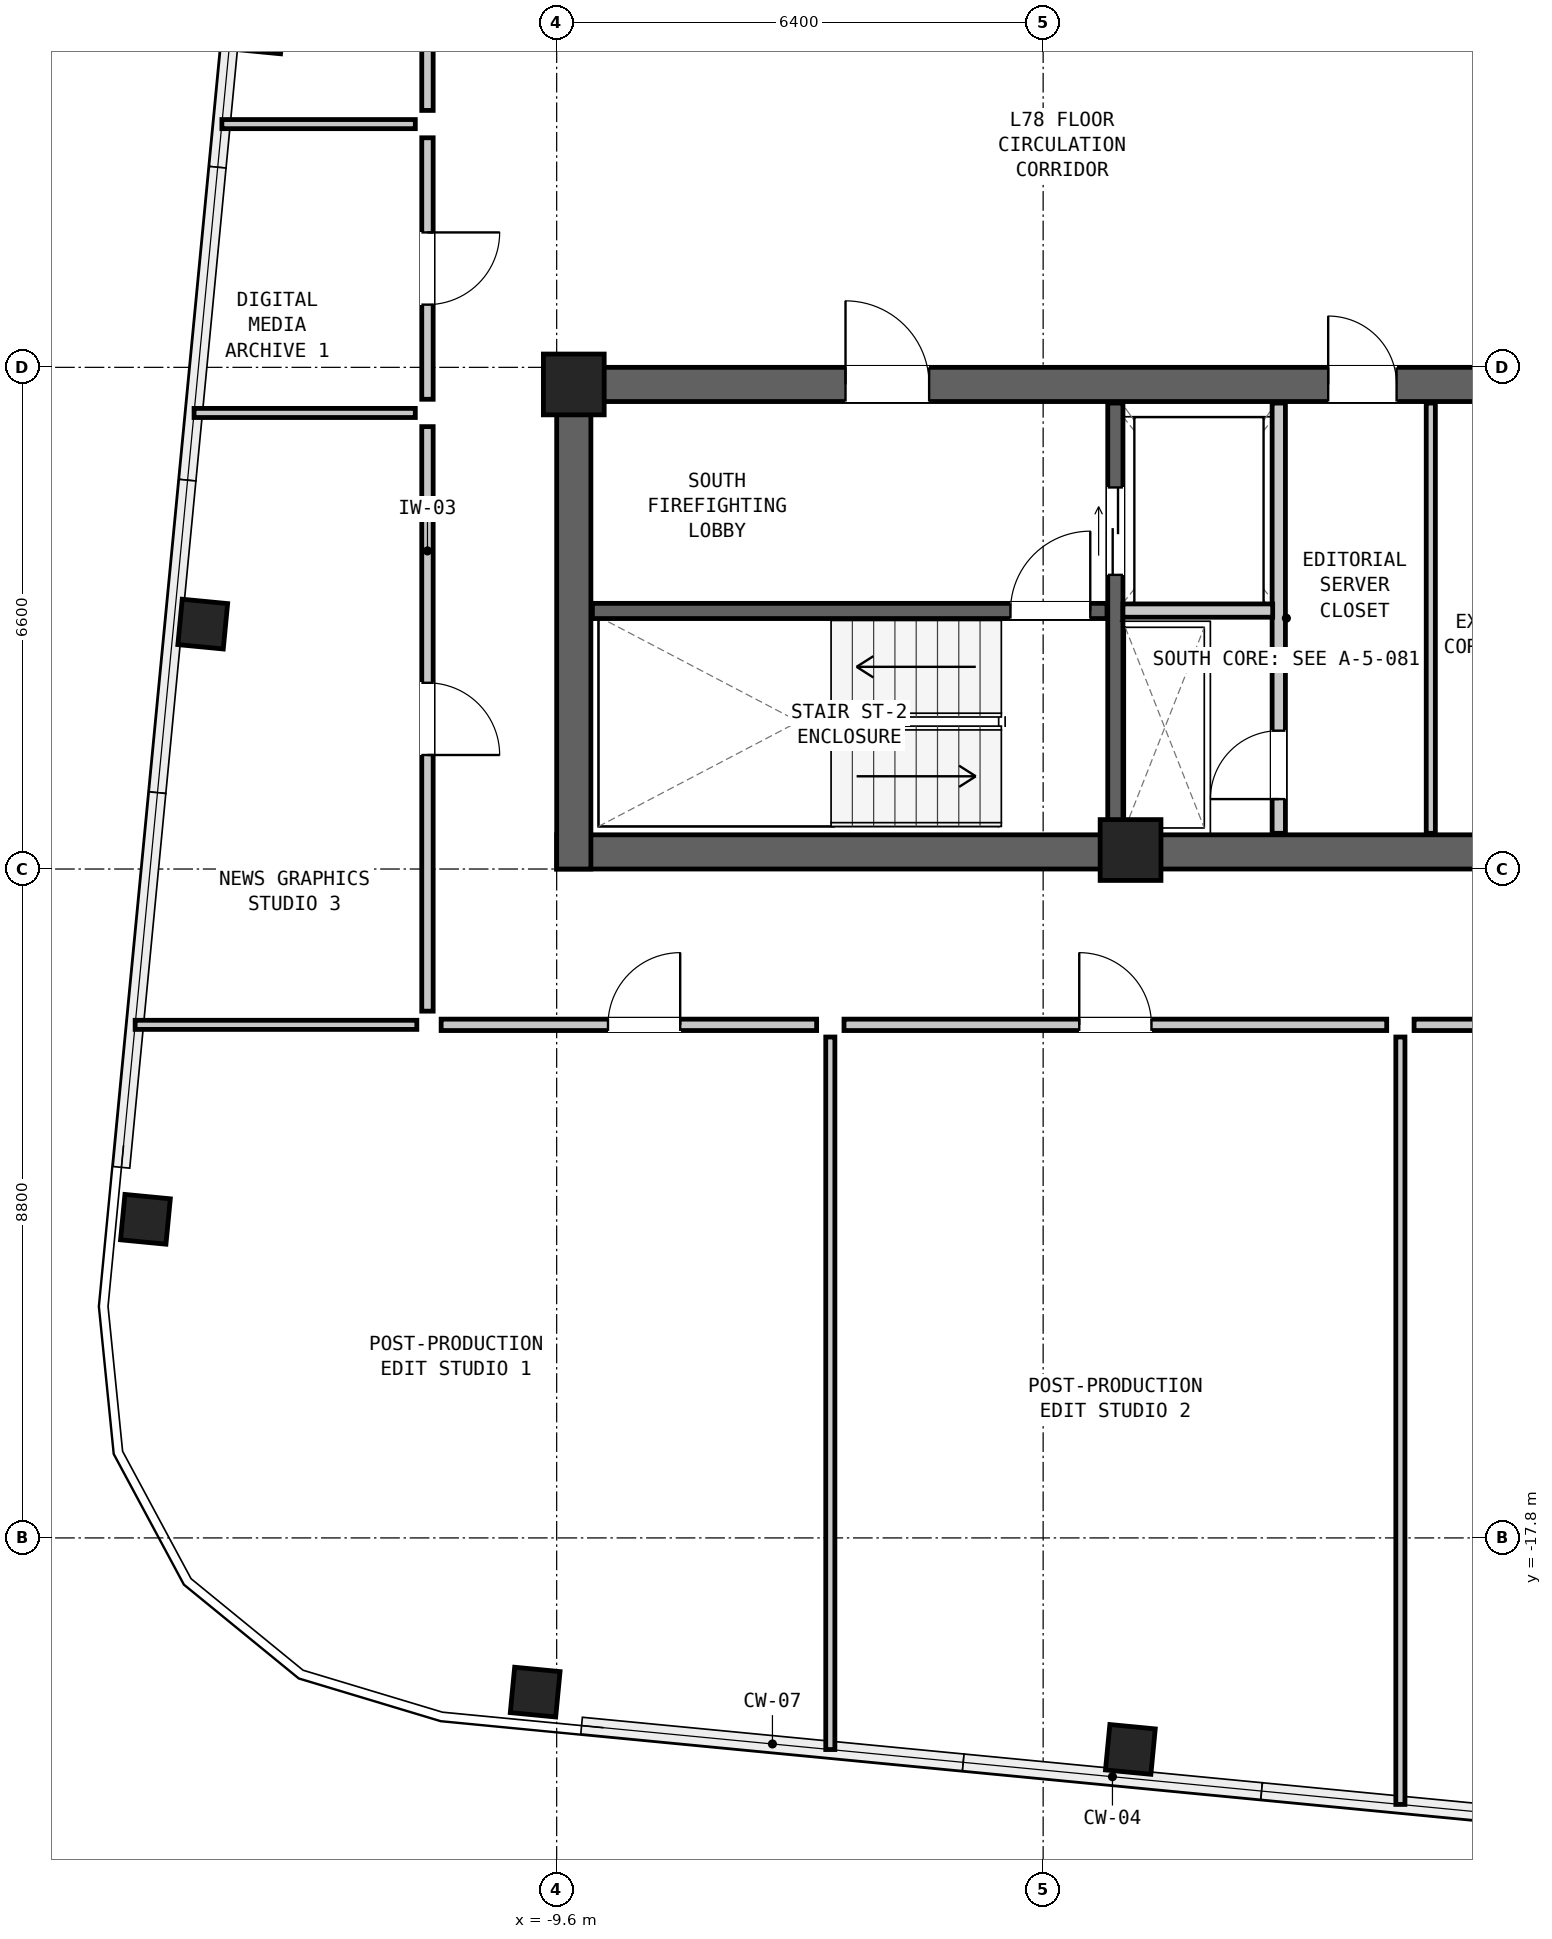
"""IFC4 building model, lengths in metres.
Left out: names, types, materials, properties, quantities, classifications, styles, units other than length and angle.
Written with IfcOpenShell. Run it as: python <this file> out.ifc"""

import sys

from ifc_helpers import new_model, si_unit, direction, frame, frame_2d, origin, origin_2d, place, context, subcontext, project, spatial, rectangle, hollow_rectangle, extrude, element, fill, save


model = new_model("IFC4")
c1 = context("Model", 3, precision=1e-05, world=origin(), true_north=direction((0.0, 1.0)))
c2 = subcontext(c1, "Body", "Model", "MODEL_VIEW")
j1 = project(units=[si_unit("LENGTHUNIT", "METRE"), si_unit("PLANEANGLEUNIT", "RADIAN")], contexts=[c1])
p1 = place(None, origin())
s1 = spatial("IfcSite", under=j1, at=p1, CompositionType="ELEMENT")
p2 = place(p1, origin())
s2 = spatial("IfcBuilding", under=s1, at=p2, CompositionType="ELEMENT")
p3 = place(p2, frame((0.0, 0.0, 264.2)))
s3 = spatial("IfcBuildingStorey", under=s2, at=p3, CompositionType="ELEMENT", Elevation=264.2)
p4 = place(p3, frame((-9.6, -8.775, 0.0), z_axis=(0.0, 0.0, 1.0), x_axis=(1.0, 0.0, 0.0)))
e1 = element("IfcWall", 1, at=p4, inside=s3, PredefinedType="SHEAR", context=c2, shape_type="SweptSolid", body=[
    extrude(rectangle(XDim=19.2, YDim=0.45, at=frame_2d((9.6, 0.0))), origin(), (0.0, 0.0, 1.0), 3.05),
])
p5 = place(p3, frame((-9.6, -2.625, 0.0), z_axis=(0.0, 0.0, 1.0), x_axis=(1.0, 0.0, 0.0)))
e2 = element("IfcWall", 2, at=p5, inside=s3, PredefinedType="SHEAR", context=c2, shape_type="SweptSolid", body=[
    extrude(rectangle(XDim=19.2, YDim=0.45, at=frame_2d((9.6, 0.0))), origin(), (0.0, 0.0, 1.0), 3.05),
])
p6 = place(p5, frame((3.8, 0.0, 0.0)))
e3 = element("IfcOpeningElement", 3, at=p6, cuts=e2, PredefinedType="OPENING", context=c2, shape_type="SweptSolid", body=[
    extrude(rectangle(XDim=1.1, YDim=2.08, at=frame_2d((0.55, 1.04))), frame((0.0, 0.237, 0.0), z_axis=(0.0, -1.0, 0.0), x_axis=(1.0, 0.0, 0.0)), (0.0, 0.0, 1.0), 0.474),
])
p7 = place(p5, frame((10.15, 0.0, 0.0)))
e4 = element("IfcOpeningElement", 4, at=p7, cuts=e2, PredefinedType="OPENING", context=c2, shape_type="SweptSolid", body=[
    extrude(rectangle(XDim=0.9, YDim=2.05, at=frame_2d((0.45, 1.025))), frame((0.0, 0.237, 0.0), z_axis=(0.0, -1.0, 0.0), x_axis=(1.0, 0.0, 0.0)), (0.0, 0.0, 1.0), 0.474),
])
p8 = place(p5, frame((12.1, 0.0, 0.0)))
e5 = element("IfcOpeningElement", 5, at=p8, cuts=e2, PredefinedType="OPENING", context=c2, shape_type="SweptSolid", body=[
    extrude(rectangle(XDim=0.95, YDim=2.1, at=frame_2d((0.475, 1.05))), frame((0.0, 0.237, 0.0), z_axis=(0.0, -1.0, 0.0), x_axis=(1.0, 0.0, 0.0)), (0.0, 0.0, 1.0), 0.474),
])
p9 = place(p5, frame((14.8, 0.0, 0.0)))
e6 = element("IfcOpeningElement", 6, at=p9, cuts=e2, PredefinedType="OPENING", context=c2, shape_type="SweptSolid", body=[
    extrude(rectangle(XDim=1.6, YDim=2.12, at=frame_2d((0.8, 1.06))), frame((0.0, 0.237, 0.0), z_axis=(0.0, -1.0, 0.0), x_axis=(1.0, 0.0, 0.0)), (0.0, 0.0, 1.0), 0.474),
])
p10 = place(p3, frame((-9.375, -9.0, 0.0), z_axis=(0.0, 0.0, 1.0), x_axis=(0.0, 1.0, 0.0)))
e7 = element("IfcWall", 7, at=p10, inside=s3, PredefinedType="SHEAR", context=c2, shape_type="SweptSolid", body=[
    extrude(rectangle(XDim=6.6, YDim=0.45, at=frame_2d((3.3, 0.0))), origin(), (0.0, 0.0, 1.0), 3.05),
])
for number, where, z_axis, x_axis in (
    (8, (-9.883, -19.829, 0.0), (0.0, 0.0, 1.0), (0.995, -0.096, 0.0)),
    (9, (-2.052, -20.583, 0.0), (0.0, 0.0, 1.0), (0.995, -0.096, 0.0)),
    (10, (-13.502, 2.052, 0.0), (0.0, 0.0, 1.0), (0.096, 0.995, 0.0)),
    (11, (-14.256, -5.778, 0.0), (0.0, 0.0, 1.0), (0.096, 0.995, 0.0)),
    (12, (-15.01, -13.608, 0.0), (0.0, 0.0, 1.0), (0.096, 0.995, 0.0)),
):
    element("IfcColumn", number, at=place(p3, frame(where, z_axis=z_axis, x_axis=x_axis)), inside=s3, PredefinedType="COLUMN", context=c2, shape_type="SweptSolid", body=[
        extrude(hollow_rectangle(XDim=0.6, YDim=0.6, WallThickness=0.04, at=origin_2d()), origin(), (0.0, 0.0, 1.0), 3.05),
    ])
for number, where, z_axis, x_axis in (
    (13, (-9.375, -2.625, 0.0), (0.0, 0.0, 1.0), (1.0, 0.0, 0.0)),
    (14, (-2.05, -8.75, 0.0), (0.0, 0.0, 1.0), (1.0, 0.0, 0.0)),
):
    element("IfcColumn", number, at=place(p3, frame(where, z_axis=z_axis, x_axis=x_axis)), inside=s3, PredefinedType="COLUMN", context=c2, shape_type="SweptSolid", body=[
        extrude(rectangle(XDim=0.8, YDim=0.8, at=origin_2d()), origin(), (0.0, 0.0, 1.0), 3.05),
    ])
p11 = place(p3, frame((-9.13, -5.605, 0.0), z_axis=(0.0, 0.0, 1.0), x_axis=(1.0, 0.0, 0.0)))
e15 = element("IfcWall", 15, at=p11, inside=s3, PredefinedType="SHEAR", context=c2, shape_type="SweptSolid", body=[
    extrude(rectangle(XDim=6.77, YDim=0.2, at=frame_2d((3.385, 0.0))), origin(), (0.0, 0.0, 1.0), 2.86),
])
p12 = place(p11, frame((5.5, 0.0, 0.0)))
e16 = element("IfcOpeningElement", 16, at=p12, cuts=e15, PredefinedType="OPENING", context=c2, shape_type="SweptSolid", body=[
    extrude(rectangle(XDim=1.05, YDim=2.08, at=frame_2d((0.525, 1.04))), frame((0.0, 0.112, 0.0), z_axis=(0.0, -1.0, 0.0), x_axis=(1.0, 0.0, 0.0)), (0.0, 0.0, 1.0), 0.224),
])
p13 = place(p3, frame((-2.25, -8.53, 0.0), z_axis=(0.0, 0.0, 1.0), x_axis=(0.0, 1.0, 0.0)))
e17 = element("IfcWall", 17, at=p13, inside=s3, PredefinedType="SHEAR", context=c2, shape_type="SweptSolid", body=[
    extrude(rectangle(XDim=5.66, YDim=0.2, at=frame_2d((2.83, 0.0))), origin(), (0.0, 0.0, 1.0), 2.86),
])
p14 = place(p13, frame((3.4, 0.0, 0.0)))
e18 = element("IfcOpeningElement", 18, at=p14, cuts=e17, PredefinedType="OPENING", context=c2, shape_type="SweptSolid", body=[
    extrude(rectangle(XDim=1.15, YDim=2.08, at=frame_2d((0.575, 1.04))), frame((0.0, 0.112, 0.0), z_axis=(0.0, -1.0, 0.0), x_axis=(1.0, 0.0, 0.0)), (0.0, 0.0, 1.0), 0.224),
])
p15 = place(p3, frame((-0.1, -8.53, 0.0), z_axis=(0.0, 0.0, 1.0), x_axis=(0.0, 1.0, 0.0)))
e19 = element("IfcWall", 19, at=p15, inside=s3, PredefinedType="PARTITIONING", context=c2, shape_type="SweptSolid", body=[
    extrude(rectangle(XDim=5.66, YDim=0.175, at=frame_2d((2.83, 0.0))), origin(), (0.0, 0.0, 1.0), 2.86),
])
p16 = place(p15, frame((0.45, 0.0, 0.0)))
e20 = element("IfcOpeningElement", 20, at=p16, cuts=e19, PredefinedType="OPENING", context=c2, shape_type="SweptSolid", body=[
    extrude(rectangle(XDim=0.9, YDim=2.05, at=frame_2d((0.45, 1.025))), frame((0.0, 0.1, 0.0), z_axis=(0.0, -1.0, 0.0), x_axis=(1.0, 0.0, 0.0)), (0.0, 0.0, 1.0), 0.199),
])
p17 = place(p3, frame((-2.15, -5.6, 0.0), z_axis=(0.0, 0.0, 1.0), x_axis=(1.0, 0.0, 0.0)))
e21 = element("IfcWall", 21, at=p17, inside=s3, PredefinedType="PARTITIONING", context=c2, shape_type="SweptSolid", body=[
    extrude(rectangle(XDim=1.97, YDim=0.175, at=frame_2d((0.985, 0.0))), origin(), (0.0, 0.0, 1.0), 2.86),
])
p18 = place(p3, frame((1.9, -8.53, 0.0), z_axis=(0.0, 0.0, 1.0), x_axis=(0.0, 1.0, 0.0)))
e22 = element("IfcWall", 22, at=p18, inside=s3, PredefinedType="PARTITIONING", context=c2, shape_type="SweptSolid", body=[
    extrude(rectangle(XDim=5.66, YDim=0.12, at=frame_2d((2.83, 0.0))), origin(), (0.0, 0.0, 1.0), 2.86),
])
p19 = place(p3, frame((-15.146, -11.05, 0.0), z_axis=(0.0, 0.0, 1.0), x_axis=(1.0, 0.0, 0.0)))
e23 = element("IfcWall", 23, at=p19, inside=s3, PredefinedType="PARTITIONING", context=c2, shape_type="SweptSolid", body=[
    extrude(rectangle(XDim=3.706, YDim=0.12, at=frame_2d((1.853, 0.0))), origin(), (0.0, 0.0, 1.0), 2.86),
])
p20 = place(p3, frame((-6.0, -20.584, 0.0), z_axis=(0.0, 0.0, 1.0), x_axis=(0.0, 1.0, 0.0)))
e24 = element("IfcWall", 24, at=p20, inside=s3, PredefinedType="PARTITIONING", context=c2, shape_type="SweptSolid", body=[
    extrude(rectangle(XDim=9.374, YDim=0.12, at=frame_2d((4.687, 0.0))), origin(), (0.0, 0.0, 1.0), 2.381),
])
p21 = place(p3, frame((1.5, -21.306, 0.0), z_axis=(0.0, 0.0, 1.0), x_axis=(0.0, 1.0, 0.0)))
e25 = element("IfcWall", 25, at=p21, inside=s3, PredefinedType="PARTITIONING", context=c2, shape_type="SweptSolid", body=[
    extrude(rectangle(XDim=10.096, YDim=0.12, at=frame_2d((5.048, 0.0))), origin(), (0.0, 0.0, 1.0), 2.86),
])
p22 = place(p3, frame((-14.371, -3.0, 0.0), z_axis=(0.0, 0.0, 1.0), x_axis=(1.0, 0.0, 0.0)))
e26 = element("IfcWall", 26, at=p22, inside=s3, PredefinedType="PARTITIONING", context=c2, shape_type="SweptSolid", body=[
    extrude(rectangle(XDim=2.911, YDim=0.12, at=frame_2d((1.455, 0.0))), origin(), (0.0, 0.0, 1.0), 1.981),
])
p23 = place(p3, frame((-14.005, 0.8, 0.0), z_axis=(0.0, 0.0, 1.0), x_axis=(1.0, 0.0, 0.0)))
e27 = element("IfcWall", 27, at=p23, inside=s3, PredefinedType="PARTITIONING", context=c2, shape_type="SweptSolid", body=[
    extrude(rectangle(XDim=2.545, YDim=0.12, at=frame_2d((1.272, 0.0))), origin(), (0.0, 0.0, 1.0), 2.381),
])
p24 = place(p3, frame((-11.12, -11.05, 0.0), z_axis=(0.0, 0.0, 1.0), x_axis=(1.0, 0.0, 0.0)))
e28 = element("IfcWall", 28, at=p24, inside=s3, PredefinedType="PARTITIONING", context=c2, shape_type="SweptSolid", body=[
    extrude(rectangle(XDim=4.94, YDim=0.15, at=frame_2d((2.47, 0.0))), origin(), (0.0, 0.0, 1.0), 2.86),
])
p25 = place(p24, frame((2.195, 0.0, 0.0)))
e29 = element("IfcOpeningElement", 29, at=p25, cuts=e28, PredefinedType="OPENING", context=c2, shape_type="SweptSolid", body=[
    extrude(rectangle(XDim=0.95, YDim=2.1, at=frame_2d((0.475, 1.05))), frame((0.0, 0.087, 0.0), z_axis=(0.0, -1.0, 0.0), x_axis=(1.0, 0.0, 0.0)), (0.0, 0.0, 1.0), 0.174),
])
p26 = place(p3, frame((-5.82, -11.05, 0.0), z_axis=(0.0, 0.0, 1.0), x_axis=(1.0, 0.0, 0.0)))
e30 = element("IfcWall", 30, at=p26, inside=s3, PredefinedType="PARTITIONING", context=c2, shape_type="SweptSolid", body=[
    extrude(rectangle(XDim=7.14, YDim=0.15, at=frame_2d((3.57, 0.0))), origin(), (0.0, 0.0, 1.0), 2.86),
])
p27 = place(p26, frame((3.095, 0.0, 0.0)))
e31 = element("IfcOpeningElement", 31, at=p27, cuts=e30, PredefinedType="OPENING", context=c2, shape_type="SweptSolid", body=[
    extrude(rectangle(XDim=0.95, YDim=2.1, at=frame_2d((0.475, 1.05))), frame((0.0, 0.087, 0.0), z_axis=(0.0, -1.0, 0.0), x_axis=(1.0, 0.0, 0.0)), (0.0, 0.0, 1.0), 0.174),
])
p28 = place(p3, frame((1.68, -11.05, 0.0), z_axis=(0.0, 0.0, 1.0), x_axis=(1.0, 0.0, 0.0)))
e32 = element("IfcWall", 32, at=p28, inside=s3, PredefinedType="PARTITIONING", context=c2, shape_type="SweptSolid", body=[
    extrude(rectangle(XDim=5.64, YDim=0.15, at=frame_2d((2.82, 0.0))), origin(), (0.0, 0.0, 1.0), 2.86),
])
p29 = place(p28, frame((2.22, 0.0, 0.0)))
e33 = element("IfcOpeningElement", 33, at=p29, cuts=e32, PredefinedType="OPENING", context=c2, shape_type="SweptSolid", body=[
    extrude(rectangle(XDim=1.2, YDim=2.1, at=frame_2d((0.6, 1.05))), frame((0.0, 0.087, 0.0), z_axis=(0.0, -1.0, 0.0), x_axis=(1.0, 0.0, 0.0)), (0.0, 0.0, 1.0), 0.174),
])
p30 = place(p3, frame((-11.3, -3.18, 0.0), z_axis=(0.0, 0.0, 1.0), x_axis=(0.0, -1.0, 0.0)))
e34 = element("IfcWall", 34, at=p30, inside=s3, PredefinedType="PARTITIONING", context=c2, shape_type="SweptSolid", body=[
    extrude(rectangle(XDim=7.69, YDim=0.15, at=frame_2d((3.845, 0.0))), origin(), (0.0, 0.0, 1.0), 2.86),
])
p31 = place(p30, frame((3.37, 0.0, 0.0)))
e35 = element("IfcOpeningElement", 35, at=p31, cuts=e34, PredefinedType="OPENING", context=c2, shape_type="SweptSolid", body=[
    extrude(rectangle(XDim=0.95, YDim=2.1, at=frame_2d((0.475, 1.05))), frame((0.0, 0.087, 0.0), z_axis=(0.0, -1.0, 0.0), x_axis=(1.0, 0.0, 0.0)), (0.0, 0.0, 1.0), 0.174),
])
p32 = place(p3, frame((-11.3, 0.62, 0.0), z_axis=(0.0, 0.0, 1.0), x_axis=(0.0, -1.0, 0.0)))
e36 = element("IfcWall", 36, at=p32, inside=s3, PredefinedType="PARTITIONING", context=c2, shape_type="SweptSolid", body=[
    extrude(rectangle(XDim=3.44, YDim=0.15, at=frame_2d((1.72, 0.0))), origin(), (0.0, 0.0, 1.0), 2.86),
])
p33 = place(p32, frame((1.245, 0.0, 0.0)))
e37 = element("IfcOpeningElement", 37, at=p33, cuts=e36, PredefinedType="OPENING", context=c2, shape_type="SweptSolid", body=[
    extrude(rectangle(XDim=0.95, YDim=2.1, at=frame_2d((0.475, 1.05))), frame((0.0, 0.087, 0.0), z_axis=(0.0, -1.0, 0.0), x_axis=(1.0, 0.0, 0.0)), (0.0, 0.0, 1.0), 0.174),
])
p34 = place(p3, frame((-11.3, 12.07, 0.0), z_axis=(0.0, 0.0, 1.0), x_axis=(0.0, -1.0, 0.0)))
e38 = element("IfcWall", 38, at=p34, inside=s3, PredefinedType="PARTITIONING", context=c2, shape_type="SweptSolid", body=[
    extrude(rectangle(XDim=11.09, YDim=0.15, at=frame_2d((5.545, 0.0))), origin(), (0.0, 0.0, 1.0), 2.86),
])
p35 = place(p34, frame((9.062, 0.0, 0.0)))
e39 = element("IfcOpeningElement", 39, at=p35, cuts=e38, PredefinedType="OPENING", context=c2, shape_type="SweptSolid", body=[
    extrude(rectangle(XDim=0.95, YDim=2.1, at=frame_2d((0.475, 1.05))), frame((0.0, 0.087, 0.0), z_axis=(0.0, -1.0, 0.0), x_axis=(1.0, 0.0, 0.0)), (0.0, 0.0, 1.0), 0.174),
])
p36 = place(p12, origin())
e40 = element("IfcDoor", 40, at=p36, inside=s3, OperationType="SINGLE_SWING_RIGHT", PredefinedType="DOOR", context=c2, shape_type="SweptSolid", body=[
    extrude(rectangle(XDim=1.05, YDim=2.08, at=frame_2d((0.525, 1.04))), frame((0.0, 0.025, 0.0), z_axis=(0.0, -1.0, 0.0), x_axis=(1.0, 0.0, 0.0)), (0.0, 0.0, 1.0), 0.05),
])
fill(e16, e40)
p37 = place(p6, origin())
e41 = element("IfcDoor", 41, at=p37, inside=s3, OperationType="SINGLE_SWING_LEFT", PredefinedType="DOOR", context=c2, shape_type="SweptSolid", body=[
    extrude(rectangle(XDim=1.1, YDim=2.08, at=frame_2d((0.55, 1.04))), frame((0.0, 0.025, 0.0), z_axis=(0.0, -1.0, 0.0), x_axis=(1.0, 0.0, 0.0)), (0.0, 0.0, 1.0), 0.05),
])
fill(e3, e41)
p38 = place(p14, origin())
e42 = element("IfcDoor", 42, at=p38, inside=s3, OperationType="DOUBLE_DOOR_SLIDING", PredefinedType="DOOR", context=c2, shape_type="SweptSolid", body=[
    extrude(rectangle(XDim=1.15, YDim=2.08, at=frame_2d((0.575, 1.04))), frame((0.0, 0.025, 0.0), z_axis=(0.0, -1.0, 0.0), x_axis=(1.0, 0.0, 0.0)), (0.0, 0.0, 1.0), 0.05),
])
fill(e18, e42)
p39 = place(p16, origin())
e43 = element("IfcDoor", 43, at=p39, inside=s3, OperationType="SINGLE_SWING_LEFT", PredefinedType="DOOR", context=c2, shape_type="SweptSolid", body=[
    extrude(rectangle(XDim=0.9, YDim=2.05, at=frame_2d((0.45, 1.025))), frame((0.0, 0.025, 0.0), z_axis=(0.0, -1.0, 0.0), x_axis=(1.0, 0.0, 0.0)), (0.0, 0.0, 1.0), 0.05),
])
fill(e20, e43)
p40 = place(p7, origin())
e44 = element("IfcDoor", 44, at=p40, inside=s3, OperationType="SINGLE_SWING_LEFT", PredefinedType="DOOR", context=c2, shape_type="SweptSolid", body=[
    extrude(rectangle(XDim=0.9, YDim=2.05, at=frame_2d((0.45, 1.025))), frame((0.0, 0.025, 0.0), z_axis=(0.0, -1.0, 0.0), x_axis=(1.0, 0.0, 0.0)), (0.0, 0.0, 1.0), 0.05),
])
fill(e4, e44)
p41 = place(p25, origin())
e45 = element("IfcDoor", 45, at=p41, inside=s3, OperationType="SINGLE_SWING_RIGHT", PredefinedType="DOOR", context=c2, shape_type="SweptSolid", body=[
    extrude(rectangle(XDim=0.95, YDim=2.1, at=frame_2d((0.475, 1.05))), frame((0.0, 0.025, 0.0), z_axis=(0.0, -1.0, 0.0), x_axis=(1.0, 0.0, 0.0)), (0.0, 0.0, 1.0), 0.05),
])
fill(e29, e45)
p42 = place(p27, origin())
e46 = element("IfcDoor", 46, at=p42, inside=s3, OperationType="SINGLE_SWING_LEFT", PredefinedType="DOOR", context=c2, shape_type="SweptSolid", body=[
    extrude(rectangle(XDim=0.95, YDim=2.1, at=frame_2d((0.475, 1.05))), frame((0.0, 0.025, 0.0), z_axis=(0.0, -1.0, 0.0), x_axis=(1.0, 0.0, 0.0)), (0.0, 0.0, 1.0), 0.05),
])
fill(e31, e46)
p43 = place(p31, origin())
e47 = element("IfcDoor", 47, at=p43, inside=s3, OperationType="SINGLE_SWING_RIGHT", PredefinedType="DOOR", context=c2, shape_type="SweptSolid", body=[
    extrude(rectangle(XDim=0.95, YDim=2.1, at=frame_2d((0.475, 1.05))), frame((0.0, 0.025, 0.0), z_axis=(0.0, -1.0, 0.0), x_axis=(1.0, 0.0, 0.0)), (0.0, 0.0, 1.0), 0.05),
])
fill(e35, e47)
p44 = place(p33, origin())
e48 = element("IfcDoor", 48, at=p44, inside=s3, OperationType="SINGLE_SWING_LEFT", PredefinedType="DOOR", context=c2, shape_type="SweptSolid", body=[
    extrude(rectangle(XDim=0.95, YDim=2.1, at=frame_2d((0.475, 1.05))), frame((0.0, 0.025, 0.0), z_axis=(0.0, -1.0, 0.0), x_axis=(1.0, 0.0, 0.0)), (0.0, 0.0, 1.0), 0.05),
])
fill(e37, e48)
save(model, sys.argv[1])
